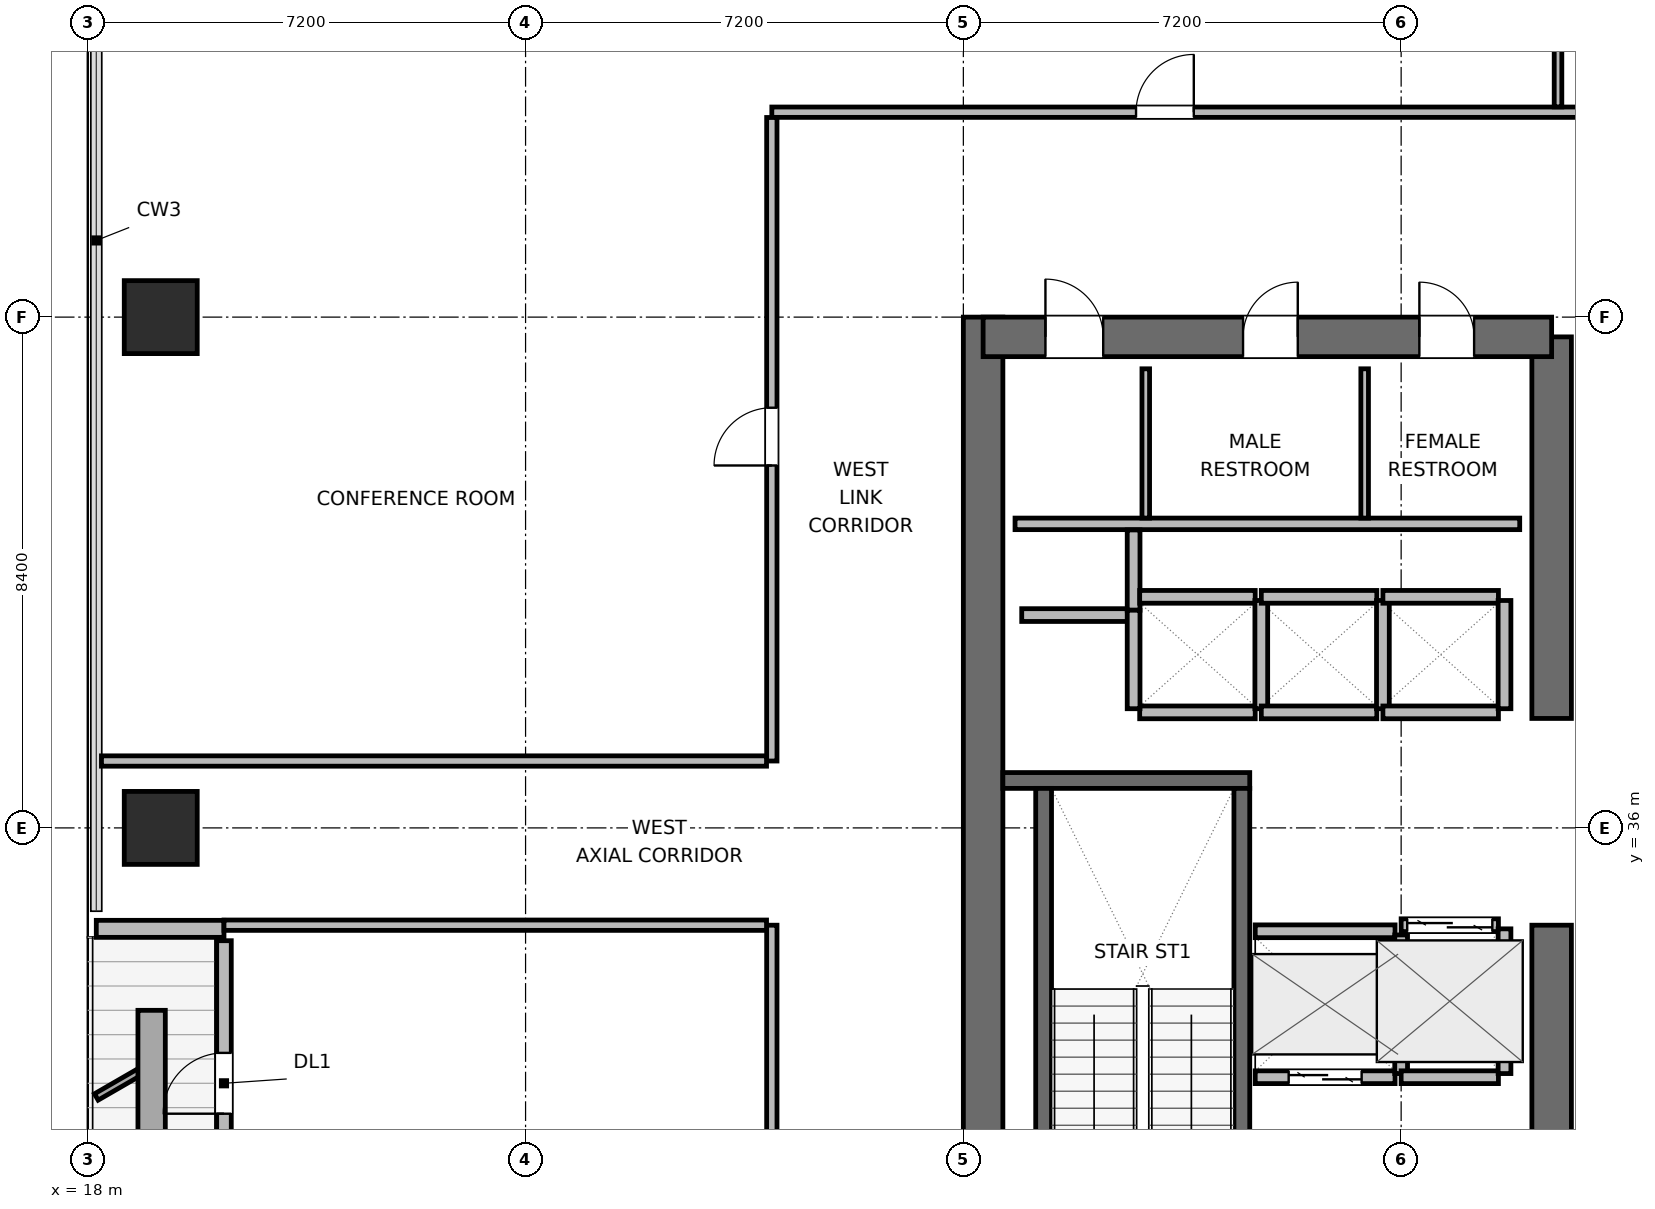
"""IFC4 building model, lengths in metres.
Left out: names, types, materials, properties, quantities, classifications, styles, units other than length and angle.
Written with IfcOpenShell. Run it as: python <this file> out.ifc"""

import sys

from ifc_helpers import new_model, si_unit, direction, frame, frame_2d, origin, origin_2d, place, context, subcontext, project, spatial, rectangle, extrude, element, fill, save


model = new_model("IFC4")
c1 = context("Model", 3, precision=1e-05, world=origin(), true_north=direction((0.0, 1.0)))
c2 = subcontext(c1, "Body", "Model", "MODEL_VIEW")
j1 = project(units=[si_unit("LENGTHUNIT", "METRE"), si_unit("PLANEANGLEUNIT", "RADIAN")], contexts=[c1])
p1 = place(None, origin())
s1 = spatial("IfcSite", under=j1, at=p1, CompositionType="ELEMENT")
p2 = place(p1, origin())
s2 = spatial("IfcBuilding", under=s1, at=p2, CompositionType="ELEMENT")
p3 = place(p2, frame((0.0, 0.0, 190.2)))
s3 = spatial("IfcBuildingStorey", under=s2, at=p3, CompositionType="ELEMENT", Elevation=190.2)
p4 = place(p3, frame((32.725, 27.6, 0.0), z_axis=(0.0, 0.0, 1.0), x_axis=(0.0, 1.0, 0.0)))
e1 = element("IfcWall", 1, at=p4, inside=s3, PredefinedType="SHEAR", context=c2, shape_type="SweptSolid", body=[
    extrude(rectangle(XDim=16.8, YDim=0.65, at=frame_2d((8.4, 0.0))), origin(), (0.0, 0.0, 1.0), 3.9),
])
p5 = place(p3, frame((42.075, 27.925, 0.0), z_axis=(0.0, 0.0, 1.0), x_axis=(0.0, 1.0, 0.0)))
e2 = element("IfcWall", 2, at=p5, inside=s3, PredefinedType="SHEAR", context=c2, shape_type="SweptSolid", body=[
    extrude(rectangle(XDim=6.475, YDim=0.65, at=frame_2d((3.237, 0.0))), origin(), (0.0, 0.0, 1.0), 3.9),
])
p6 = place(p3, frame((42.075, 37.8, 0.0), z_axis=(0.0, 0.0, 1.0), x_axis=(0.0, 1.0, 0.0)))
e3 = element("IfcWall", 3, at=p6, inside=s3, PredefinedType="SHEAR", context=c2, shape_type="SweptSolid", body=[
    extrude(rectangle(XDim=6.275, YDim=0.65, at=frame_2d((3.137, 0.0))), origin(), (0.0, 0.0, 1.0), 3.9),
])
p7 = place(p3, frame((32.725, 44.075, 0.0), z_axis=(0.0, 0.0, 1.0), x_axis=(1.0, 0.0, 0.0)))
e4 = element("IfcWall", 4, at=p7, inside=s3, PredefinedType="SHEAR", context=c2, shape_type="SweptSolid", body=[
    extrude(rectangle(XDim=9.35, YDim=0.65, at=frame_2d((4.675, 0.0))), origin(), (0.0, 0.0, 1.0), 3.9),
])
p8 = place(p7, frame((1.025, 0.0, 0.0)))
e5 = element("IfcOpeningElement", 5, at=p8, cuts=e4, PredefinedType="OPENING", context=c2, shape_type="SweptSolid", body=[
    extrude(rectangle(XDim=0.95, YDim=2.04, at=frame_2d((0.475, 1.02))), frame((0.0, 0.335, 0.0), z_axis=(0.0, -1.0, 0.0), x_axis=(1.0, 0.0, 0.0)), (0.0, 0.0, 1.0), 0.67),
])
p9 = place(p7, frame((4.275, 0.0, 0.0)))
e6 = element("IfcOpeningElement", 6, at=p9, cuts=e4, PredefinedType="OPENING", context=c2, shape_type="SweptSolid", body=[
    extrude(rectangle(XDim=0.9, YDim=2.02, at=frame_2d((0.45, 1.01))), frame((0.0, 0.335, 0.0), z_axis=(0.0, -1.0, 0.0), x_axis=(1.0, 0.0, 0.0)), (0.0, 0.0, 1.0), 0.67),
])
p10 = place(p7, frame((7.175, 0.0, 0.0)))
e7 = element("IfcOpeningElement", 7, at=p10, cuts=e4, PredefinedType="OPENING", context=c2, shape_type="SweptSolid", body=[
    extrude(rectangle(XDim=0.9, YDim=2.02, at=frame_2d((0.45, 1.01))), frame((0.0, 0.335, 0.0), z_axis=(0.0, -1.0, 0.0), x_axis=(1.0, 0.0, 0.0)), (0.0, 0.0, 1.0), 0.67),
])
p11 = place(p3, frame((33.05, 36.78, 0.0), z_axis=(0.0, 0.0, 1.0), x_axis=(1.0, 0.0, 0.0)))
e8 = element("IfcWall", 8, at=p11, inside=s3, PredefinedType="SHEAR", context=c2, shape_type="SweptSolid", body=[
    extrude(rectangle(XDim=4.06, YDim=0.26, at=frame_2d((2.03, 0.0))), origin(), (0.0, 0.0, 1.0), 3.9),
])
p12 = place(p3, frame((33.72, 29.05, 0.0), z_axis=(0.0, 0.0, 1.0), x_axis=(0.0, 1.0, 0.0)))
e9 = element("IfcWall", 9, at=p12, inside=s3, PredefinedType="SHEAR", context=c2, shape_type="SweptSolid", body=[
    extrude(rectangle(XDim=7.6, YDim=0.26, at=frame_2d((3.8, 0.0))), origin(), (0.0, 0.0, 1.0), 3.9),
])
p13 = place(p3, frame((36.98, 29.05, 0.0), z_axis=(0.0, 0.0, 1.0), x_axis=(0.0, 1.0, 0.0)))
e10 = element("IfcWall", 10, at=p13, inside=s3, PredefinedType="SHEAR", context=c2, shape_type="SweptSolid", body=[
    extrude(rectangle(XDim=7.6, YDim=0.26, at=frame_2d((3.8, 0.0))), origin(), (0.0, 0.0, 1.0), 3.9),
])
p14 = place(p13, frame((0.3, 0.0, 0.0)))
e11 = element("IfcOpeningElement", 11, at=p14, cuts=e10, PredefinedType="OPENING", context=c2, shape_type="SweptSolid", body=[
    extrude(rectangle(XDim=1.0, YDim=2.04, at=frame_2d((0.5, 1.02))), frame((0.0, 0.14, 0.0), z_axis=(0.0, -1.0, 0.0), x_axis=(1.0, 0.0, 0.0)), (0.0, 0.0, 1.0), 0.28),
])
for number, where, z_axis, x_axis in (
    (12, (19.2, 36.0, 0.0), (0.0, 0.0, 1.0), (1.0, 0.0, 0.0)),
    (13, (19.2, 44.4, 0.0), (0.0, 0.0, 1.0), (1.0, 0.0, 0.0)),
):
    element("IfcColumn", number, at=place(p3, frame(where, z_axis=z_axis, x_axis=x_axis)), inside=s3, PredefinedType="COLUMN", context=c2, shape_type="SweptSolid", body=[
        extrude(rectangle(XDim=1.2, YDim=1.2, at=origin_2d()), origin(), (0.0, 0.0, 1.0), 3.9),
    ])
p15 = place(p3, frame((20.24, 29.455, 0.0), z_axis=(0.0, 0.0, 1.0), x_axis=(0.0, 1.0, 0.0)))
e14 = element("IfcWall", 14, at=p15, inside=s3, PredefinedType="SOLIDWALL", context=c2, shape_type="SweptSolid", body=[
    extrude(rectangle(XDim=4.69, YDim=0.24, at=frame_2d((2.345, 0.0))), origin(), (0.0, 0.0, 1.0), 3.248),
])
p16 = place(p15, frame((1.845, 0.0, 0.0)))
e15 = element("IfcOpeningElement", 15, at=p16, cuts=e14, PredefinedType="OPENING", context=c2, shape_type="SweptSolid", body=[
    extrude(rectangle(XDim=1.0, YDim=2.02, at=frame_2d((0.5, 1.01))), frame((0.0, 0.13, 0.0), z_axis=(0.0, -1.0, 0.0), x_axis=(1.0, 0.0, 0.0)), (0.0, 0.0, 1.0), 0.26),
])
p17 = place(p3, frame((20.24, 34.34, 0.0), z_axis=(0.0, 0.0, 1.0), x_axis=(-1.0, 0.0, 0.0)))
e16 = element("IfcWall", 16, at=p17, inside=s3, PredefinedType="SOLIDWALL", context=c2, shape_type="SweptSolid", body=[
    extrude(rectangle(XDim=2.1, YDim=0.28, at=frame_2d((1.05, 0.0))), origin(), (0.0, 0.0, 1.0), 3.116),
])
p18 = place(p3, frame((33.25, 41.0, 0.0), z_axis=(0.0, 0.0, 1.0), x_axis=(1.0, 0.0, 0.0)))
e17 = element("IfcWall", 17, at=p18, inside=s3, PredefinedType="PLUMBINGWALL", context=c2, shape_type="SweptSolid", body=[
    extrude(rectangle(XDim=8.3, YDim=0.19, at=frame_2d((4.15, 0.0))), origin(), (0.0, 0.0, 1.0), 3.68),
])
for number, where, z_axis, x_axis in (
    (18, (35.4, 41.095, 0.0), (0.0, 0.0, 1.0), (0.0, 1.0, 0.0)),
    (19, (39.0, 41.095, 0.0), (0.0, 0.0, 1.0), (0.0, 1.0, 0.0)),
):
    element("IfcWall", number, at=place(p3, frame(where, z_axis=z_axis, x_axis=x_axis)), inside=s3, PredefinedType="PARTITIONING", context=c2, shape_type="SweptSolid", body=[
        extrude(rectangle(XDim=2.455, YDim=0.125, at=frame_2d((1.228, 0.0))), origin(), (0.0, 0.0, 1.0), 3.68),
    ])
p19 = place(p3, frame((33.36, 39.5, 0.0), z_axis=(0.0, 0.0, 1.0), x_axis=(1.0, 0.0, 0.0)))
e20 = element("IfcWall", 20, at=p19, inside=s3, PredefinedType="PARTITIONING", context=c2, shape_type="SweptSolid", body=[
    extrude(rectangle(XDim=1.86, YDim=0.21, at=frame_2d((0.93, 0.0))), origin(), (0.0, 0.0, 1.0), 3.68),
])
p20 = place(p3, frame((35.2, 39.58, 0.0), z_axis=(0.0, 0.0, 1.0), x_axis=(0.0, 1.0, 0.0)))
e21 = element("IfcWall", 21, at=p20, inside=s3, PredefinedType="PARTITIONING", context=c2, shape_type="SweptSolid", body=[
    extrude(rectangle(XDim=1.32, YDim=0.21, at=frame_2d((0.66, 0.0))), origin(), (0.0, 0.0, 1.0), 3.68),
])
p21 = place(p3, frame((37.2, 31.9, 0.0), z_axis=(0.0, 0.0, 1.0), x_axis=(1.0, 0.0, 0.0)))
e22 = element("IfcWall", 22, at=p21, inside=s3, PredefinedType="PARTITIONING", context=c2, shape_type="SweptSolid", body=[
    extrude(rectangle(XDim=2.3, YDim=0.21, at=frame_2d((1.15, 0.0))), origin(), (0.0, 0.0, 1.0), 3.68),
])
p22 = place(p21, frame((0.55, 0.0, 0.0)))
e23 = element("IfcOpeningElement", 23, at=p22, cuts=e22, PredefinedType="OPENING", context=c2, shape_type="SweptSolid", body=[
    extrude(rectangle(XDim=1.2, YDim=2.04, at=frame_2d((0.6, 1.02))), frame((0.0, 0.115, 0.0), z_axis=(0.0, -1.0, 0.0), x_axis=(1.0, 0.0, 0.0)), (0.0, 0.0, 1.0), 0.23),
])
p23 = place(p3, frame((37.2, 34.3, 0.0), z_axis=(0.0, 0.0, 1.0), x_axis=(1.0, 0.0, 0.0)))
e24 = element("IfcWall", 24, at=p23, inside=s3, PredefinedType="PARTITIONING", context=c2, shape_type="SweptSolid", body=[
    extrude(rectangle(XDim=2.3, YDim=0.21, at=frame_2d((1.15, 0.0))), origin(), (0.0, 0.0, 1.0), 3.68),
])
p24 = place(p3, frame((39.6, 31.96, 0.0), z_axis=(0.0, 0.0, 1.0), x_axis=(0.0, 1.0, 0.0)))
e25 = element("IfcWall", 25, at=p24, inside=s3, PredefinedType="PARTITIONING", context=c2, shape_type="SweptSolid", body=[
    extrude(rectangle(XDim=2.28, YDim=0.21, at=frame_2d((1.14, 0.0))), origin(), (0.0, 0.0, 1.0), 3.68),
])
p25 = place(p3, frame((39.6, 34.4, 0.0), z_axis=(0.0, 0.0, 1.0), x_axis=(1.0, 0.0, 0.0)))
e26 = element("IfcWall", 26, at=p25, inside=s3, PredefinedType="PARTITIONING", context=c2, shape_type="SweptSolid", body=[
    extrude(rectangle(XDim=1.6, YDim=0.21, at=frame_2d((0.8, 0.0))), origin(), (0.0, 0.0, 1.0), 3.68),
])
p26 = place(p25, frame((0.1, 0.0, 0.0)))
e27 = element("IfcOpeningElement", 27, at=p26, cuts=e26, PredefinedType="OPENING", context=c2, shape_type="SweptSolid", body=[
    extrude(rectangle(XDim=1.4, YDim=2.06, at=frame_2d((0.7, 1.03))), frame((0.0, 0.115, 0.0), z_axis=(0.0, -1.0, 0.0), x_axis=(1.0, 0.0, 0.0)), (0.0, 0.0, 1.0), 0.23),
])
p27 = place(p3, frame((39.6, 31.9, 0.0), z_axis=(0.0, 0.0, 1.0), x_axis=(1.0, 0.0, 0.0)))
e28 = element("IfcWall", 28, at=p27, inside=s3, PredefinedType="PARTITIONING", context=c2, shape_type="SweptSolid", body=[
    extrude(rectangle(XDim=1.6, YDim=0.21, at=frame_2d((0.8, 0.0))), origin(), (0.0, 0.0, 1.0), 3.68),
])
p28 = place(p3, frame((41.3, 31.96, 0.0), z_axis=(0.0, 0.0, 1.0), x_axis=(0.0, 1.0, 0.0)))
e29 = element("IfcWall", 29, at=p28, inside=s3, PredefinedType="PARTITIONING", context=c2, shape_type="SweptSolid", body=[
    extrude(rectangle(XDim=2.38, YDim=0.21, at=frame_2d((1.19, 0.0))), origin(), (0.0, 0.0, 1.0), 3.68),
])
for number, where, z_axis, x_axis in (
    (30, (35.3, 37.9, 0.0), (0.0, 0.0, 1.0), (1.0, 0.0, 0.0)),
    (31, (35.3, 39.8, 0.0), (0.0, 0.0, 1.0), (1.0, 0.0, 0.0)),
):
    element("IfcWall", number, at=place(p3, frame(where, z_axis=z_axis, x_axis=x_axis)), inside=s3, PredefinedType="PARTITIONING", context=c2, shape_type="SweptSolid", body=[
        extrude(rectangle(XDim=1.9, YDim=0.21, at=frame_2d((0.95, 0.0))), origin(), (0.0, 0.0, 1.0), 3.68),
    ])
p29 = place(p3, frame((35.2, 37.96, 0.0), z_axis=(0.0, 0.0, 1.0), x_axis=(0.0, 1.0, 0.0)))
e32 = element("IfcWall", 32, at=p29, inside=s3, PredefinedType="PARTITIONING", context=c2, shape_type="SweptSolid", body=[
    extrude(rectangle(XDim=1.62, YDim=0.21, at=frame_2d((0.81, 0.0))), origin(), (0.0, 0.0, 1.0), 3.68),
])
p30 = place(p3, frame((37.3, 37.96, 0.0), z_axis=(0.0, 0.0, 1.0), x_axis=(0.0, 1.0, 0.0)))
e33 = element("IfcWall", 33, at=p30, inside=s3, PredefinedType="PARTITIONING", context=c2, shape_type="SweptSolid", body=[
    extrude(rectangle(XDim=1.78, YDim=0.21, at=frame_2d((0.89, 0.0))), origin(), (0.0, 0.0, 1.0), 3.68),
])
for number, where, z_axis, x_axis in (
    (34, (37.3, 37.9, 0.0), (0.0, 0.0, 1.0), (1.0, 0.0, 0.0)),
    (35, (37.3, 39.8, 0.0), (0.0, 0.0, 1.0), (1.0, 0.0, 0.0)),
):
    element("IfcWall", number, at=place(p3, frame(where, z_axis=z_axis, x_axis=x_axis)), inside=s3, PredefinedType="PARTITIONING", context=c2, shape_type="SweptSolid", body=[
        extrude(rectangle(XDim=1.9, YDim=0.21, at=frame_2d((0.95, 0.0))), origin(), (0.0, 0.0, 1.0), 3.68),
    ])
p31 = place(p3, frame((39.3, 37.96, 0.0), z_axis=(0.0, 0.0, 1.0), x_axis=(0.0, 1.0, 0.0)))
e36 = element("IfcWall", 36, at=p31, inside=s3, PredefinedType="PARTITIONING", context=c2, shape_type="SweptSolid", body=[
    extrude(rectangle(XDim=1.78, YDim=0.21, at=frame_2d((0.89, 0.0))), origin(), (0.0, 0.0, 1.0), 3.68),
])
for number, where, z_axis, x_axis in (
    (37, (39.3, 37.9, 0.0), (0.0, 0.0, 1.0), (1.0, 0.0, 0.0)),
    (38, (39.3, 39.8, 0.0), (0.0, 0.0, 1.0), (1.0, 0.0, 0.0)),
):
    element("IfcWall", number, at=place(p3, frame(where, z_axis=z_axis, x_axis=x_axis)), inside=s3, PredefinedType="PARTITIONING", context=c2, shape_type="SweptSolid", body=[
        extrude(rectangle(XDim=1.9, YDim=0.21, at=frame_2d((0.95, 0.0))), origin(), (0.0, 0.0, 1.0), 3.68),
    ])
p32 = place(p3, frame((41.3, 37.96, 0.0), z_axis=(0.0, 0.0, 1.0), x_axis=(0.0, 1.0, 0.0)))
e39 = element("IfcWall", 39, at=p32, inside=s3, PredefinedType="PARTITIONING", context=c2, shape_type="SweptSolid", body=[
    extrude(rectangle(XDim=1.78, YDim=0.21, at=frame_2d((0.89, 0.0))), origin(), (0.0, 0.0, 1.0), 3.68),
])
p33 = place(p3, frame((29.25, 47.77, 0.0), z_axis=(0.0, 0.0, 1.0), x_axis=(1.0, 0.0, 0.0)))
e40 = element("IfcWall", 40, at=p33, inside=s3, PredefinedType="PARTITIONING", context=c2, shape_type="SweptSolid", body=[
    extrude(rectangle(XDim=34.35, YDim=0.17, at=frame_2d((17.175, 0.0))), origin(), (0.0, 0.0, 1.0), 3.68),
])
p34 = place(p33, frame((5.99, 0.0, 0.0)))
e41 = element("IfcOpeningElement", 41, at=p34, cuts=e40, PredefinedType="OPENING", context=c2, shape_type="SweptSolid", body=[
    extrude(rectangle(XDim=0.95, YDim=2.04, at=frame_2d((0.475, 1.02))), frame((0.0, 0.095, 0.0), z_axis=(0.0, -1.0, 0.0), x_axis=(1.0, 0.0, 0.0)), (0.0, 0.0, 1.0), 0.19),
])
p35 = place(p33, frame((19.635, 0.0, 0.0)))
e42 = element("IfcOpeningElement", 42, at=p35, cuts=e40, PredefinedType="OPENING", context=c2, shape_type="SweptSolid", body=[
    extrude(rectangle(XDim=0.95, YDim=2.04, at=frame_2d((0.475, 1.02))), frame((0.0, 0.095, 0.0), z_axis=(0.0, -1.0, 0.0), x_axis=(1.0, 0.0, 0.0)), (0.0, 0.0, 1.0), 0.19),
])
p36 = place(p33, frame((30.345, 0.0, 0.0)))
e43 = element("IfcOpeningElement", 43, at=p36, cuts=e40, PredefinedType="OPENING", context=c2, shape_type="SweptSolid", body=[
    extrude(rectangle(XDim=0.95, YDim=2.04, at=frame_2d((0.475, 1.02))), frame((0.0, 0.095, 0.0), z_axis=(0.0, -1.0, 0.0), x_axis=(1.0, 0.0, 0.0)), (0.0, 0.0, 1.0), 0.19),
])
p37 = place(p3, frame((29.25, 24.317, 0.0), z_axis=(0.0, 0.0, 1.0), x_axis=(0.0, 1.0, 0.0)))
e44 = element("IfcWall", 44, at=p37, inside=s3, PredefinedType="PARTITIONING", context=c2, shape_type="SweptSolid", body=[
    extrude(rectangle(XDim=10.083, YDim=0.17, at=frame_2d((5.042, 0.0))), origin(), (0.0, 0.0, 1.0), 3.68),
])
p38 = place(p37, frame((4.523, 0.0, 0.0)))
e45 = element("IfcOpeningElement", 45, at=p38, cuts=e44, PredefinedType="OPENING", context=c2, shape_type="SweptSolid", body=[
    extrude(rectangle(XDim=0.95, YDim=2.04, at=frame_2d((0.475, 1.02))), frame((0.0, 0.095, 0.0), z_axis=(0.0, -1.0, 0.0), x_axis=(1.0, 0.0, 0.0)), (0.0, 0.0, 1.0), 0.19),
])
p39 = place(p3, frame((29.25, 37.1, 0.0), z_axis=(0.0, 0.0, 1.0), x_axis=(0.0, 1.0, 0.0)))
e46 = element("IfcWall", 46, at=p39, inside=s3, PredefinedType="PARTITIONING", context=c2, shape_type="SweptSolid", body=[
    extrude(rectangle(XDim=10.583, YDim=0.17, at=frame_2d((5.292, 0.0))), origin(), (0.0, 0.0, 1.0), 3.68),
])
p40 = place(p39, frame((4.86, 0.0, 0.0)))
e47 = element("IfcOpeningElement", 47, at=p40, cuts=e46, PredefinedType="OPENING", context=c2, shape_type="SweptSolid", body=[
    extrude(rectangle(XDim=0.95, YDim=2.04, at=frame_2d((0.475, 1.02))), frame((0.0, 0.095, 0.0), z_axis=(0.0, -1.0, 0.0), x_axis=(1.0, 0.0, 0.0)), (0.0, 0.0, 1.0), 0.19),
])
p41 = place(p3, frame((42.18, 47.857, 0.0), z_axis=(0.0, 0.0, 1.0), x_axis=(0.0, 1.0, 0.0)))
e48 = element("IfcWall", 48, at=p41, inside=s3, PredefinedType="PARTITIONING", context=c2, shape_type="SweptSolid", body=[
    extrude(rectangle(XDim=13.73, YDim=0.125, at=frame_2d((6.865, 0.0))), origin(), (0.0, 0.0, 1.0), 3.043),
])
p42 = place(p3, frame((20.24, 34.4, 0.0), z_axis=(0.0, 0.0, 1.0), x_axis=(1.0, 0.0, 0.0)))
e49 = element("IfcWall", 49, at=p42, inside=s3, PredefinedType="PARTITIONING", context=c2, shape_type="SweptSolid", body=[
    extrude(rectangle(XDim=8.923, YDim=0.17, at=frame_2d((4.461, 0.0))), origin(), (0.0, 0.0, 1.0), 3.68),
])
p43 = place(p3, frame((18.225, 37.1, 0.0), z_axis=(0.0, 0.0, 1.0), x_axis=(1.0, 0.0, 0.0)))
e50 = element("IfcWall", 50, at=p43, inside=s3, PredefinedType="PARTITIONING", context=c2, shape_type="SweptSolid", body=[
    extrude(rectangle(XDim=10.938, YDim=0.17, at=frame_2d((5.469, 0.0))), origin(), (0.0, 0.0, 1.0), 3.68),
])
p44 = place(p16, origin())
e51 = element("IfcDoor", 51, at=p44, inside=s3, OperationType="SINGLE_SWING_LEFT", PredefinedType="DOOR", context=c2, shape_type="SweptSolid", body=[
    extrude(rectangle(XDim=1.0, YDim=2.02, at=frame_2d((0.5, 1.01))), frame((0.0, 0.025, 0.0), z_axis=(0.0, -1.0, 0.0), x_axis=(1.0, 0.0, 0.0)), (0.0, 0.0, 1.0), 0.05),
])
fill(e15, e51)
p45 = place(p22, origin())
e52 = element("IfcDoor", 52, at=p45, inside=s3, OperationType="DOUBLE_DOOR_SLIDING", PredefinedType="DOOR", context=c2, shape_type="SweptSolid", body=[
    extrude(rectangle(XDim=1.2, YDim=2.04, at=frame_2d((0.6, 1.02))), frame((0.0, 0.025, 0.0), z_axis=(0.0, -1.0, 0.0), x_axis=(1.0, 0.0, 0.0)), (0.0, 0.0, 1.0), 0.05),
])
fill(e23, e52)
p46 = place(p26, origin())
e53 = element("IfcDoor", 53, at=p46, inside=s3, OperationType="DOUBLE_DOOR_SLIDING", PredefinedType="DOOR", context=c2, shape_type="SweptSolid", body=[
    extrude(rectangle(XDim=1.4, YDim=2.06, at=frame_2d((0.7, 1.03))), frame((0.0, 0.025, 0.0), z_axis=(0.0, -1.0, 0.0), x_axis=(1.0, 0.0, 0.0)), (0.0, 0.0, 1.0), 0.05),
])
fill(e27, e53)
p47 = place(p8, origin())
e54 = element("IfcDoor", 54, at=p47, inside=s3, OperationType="SINGLE_SWING_LEFT", PredefinedType="DOOR", context=c2, shape_type="SweptSolid", body=[
    extrude(rectangle(XDim=0.95, YDim=2.04, at=frame_2d((0.475, 1.02))), frame((0.0, 0.025, 0.0), z_axis=(0.0, -1.0, 0.0), x_axis=(1.0, 0.0, 0.0)), (0.0, 0.0, 1.0), 0.05),
])
fill(e5, e54)
p48 = place(p9, origin())
e55 = element("IfcDoor", 55, at=p48, inside=s3, OperationType="SINGLE_SWING_RIGHT", PredefinedType="DOOR", context=c2, shape_type="SweptSolid", body=[
    extrude(rectangle(XDim=0.9, YDim=2.02, at=frame_2d((0.45, 1.01))), frame((0.0, 0.025, 0.0), z_axis=(0.0, -1.0, 0.0), x_axis=(1.0, 0.0, 0.0)), (0.0, 0.0, 1.0), 0.05),
])
fill(e6, e55)
p49 = place(p10, origin())
e56 = element("IfcDoor", 56, at=p49, inside=s3, OperationType="SINGLE_SWING_LEFT", PredefinedType="DOOR", context=c2, shape_type="SweptSolid", body=[
    extrude(rectangle(XDim=0.9, YDim=2.02, at=frame_2d((0.45, 1.01))), frame((0.0, 0.025, 0.0), z_axis=(0.0, -1.0, 0.0), x_axis=(1.0, 0.0, 0.0)), (0.0, 0.0, 1.0), 0.05),
])
fill(e7, e56)
p50 = place(p34, origin())
e57 = element("IfcDoor", 57, at=p50, inside=s3, OperationType="SINGLE_SWING_RIGHT", PredefinedType="DOOR", context=c2, shape_type="SweptSolid", body=[
    extrude(rectangle(XDim=0.95, YDim=2.04, at=frame_2d((0.475, 1.02))), frame((0.0, 0.025, 0.0), z_axis=(0.0, -1.0, 0.0), x_axis=(1.0, 0.0, 0.0)), (0.0, 0.0, 1.0), 0.05),
])
fill(e41, e57)
p51 = place(p40, origin())
e58 = element("IfcDoor", 58, at=p51, inside=s3, OperationType="SINGLE_SWING_LEFT", PredefinedType="DOOR", context=c2, shape_type="SweptSolid", body=[
    extrude(rectangle(XDim=0.95, YDim=2.04, at=frame_2d((0.475, 1.02))), frame((0.0, 0.025, 0.0), z_axis=(0.0, -1.0, 0.0), x_axis=(1.0, 0.0, 0.0)), (0.0, 0.0, 1.0), 0.05),
])
fill(e47, e58)
save(model, sys.argv[1])
